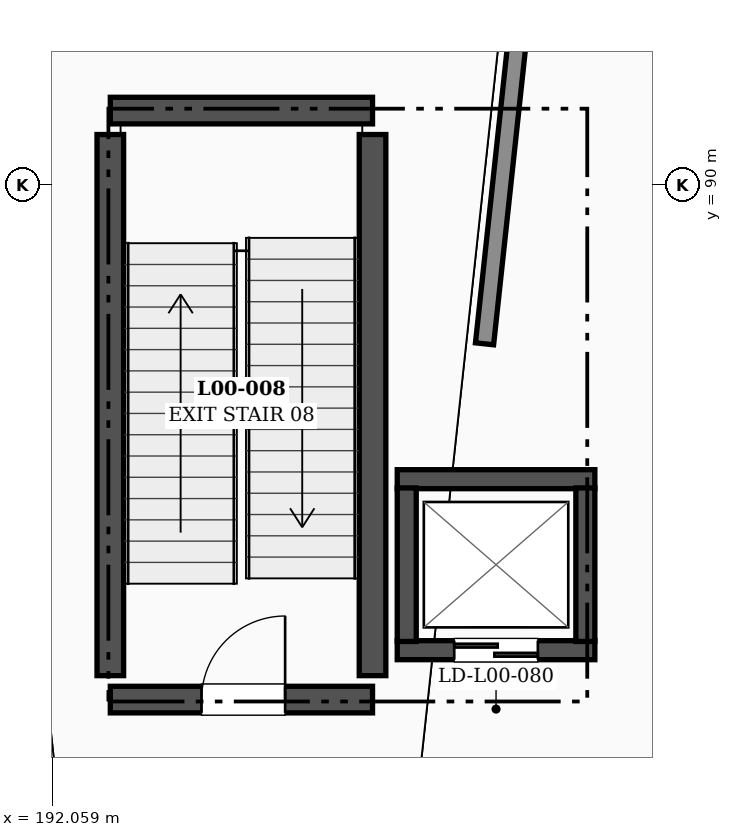
"""IFC4 building model, lengths in metres.
Left out: names, types, materials, properties, quantities, classifications, styles, units other than length and angle.
Written with IfcOpenShell. Run it as: python <this file> out.ifc"""

import sys

from ifc_helpers import new_model, si_unit, direction, frame, frame_2d, origin, place, context, subcontext, project, spatial, rectangle, extrude, element, fill, save


model = new_model("IFC4")
c1 = context("Model", 3, precision=1e-05, world=origin(), true_north=direction((0.0, 1.0)))
c2 = subcontext(c1, "Body", "Model", "MODEL_VIEW")
j1 = project(units=[si_unit("LENGTHUNIT", "METRE"), si_unit("PLANEANGLEUNIT", "RADIAN")], contexts=[c1])
p1 = place(None, origin())
s1 = spatial("IfcSite", under=j1, at=p1, CompositionType="ELEMENT")
p2 = place(p1, origin())
s2 = spatial("IfcBuilding", under=s1, at=p2, CompositionType="ELEMENT")
p3 = place(p2, origin())
s3 = spatial("IfcBuildingStorey", under=s2, at=p3, CompositionType="ELEMENT", Elevation=0.0)
p4 = place(p3, frame((205.371, 90.653, 0.0), z_axis=(0.0, 0.0, 1.0), x_axis=(-0.794325535109, 0.607492340918, 0.0)))
e1 = element("IfcWall", 1, at=p4, inside=s3, PredefinedType="SOLIDWALL", context=c2, shape_type="SweptSolid", body=[
    extrude(rectangle(XDim=8.583, YDim=0.26, at=frame_2d((4.291, 0.0))), origin(), (0.0, 0.0, 1.0), 4.99),
])
p5 = place(p4, frame((3.191, 0.0, 0.0)))
e2 = element("IfcOpeningElement", 2, at=p5, cuts=e1, PredefinedType="OPENING", context=c2, shape_type="SweptSolid", body=[
    extrude(rectangle(XDim=2.2, YDim=2.45, at=frame_2d((1.1, 1.225))), frame((0.0, 0.14, 0.0), z_axis=(0.0, -1.0, 0.0), x_axis=(1.0, 0.0, 0.0)), (0.0, 0.0, 1.0), 0.28),
])
p6 = place(p3, frame((192.825, 83.225, 0.0), z_axis=(0.0, 0.0, 1.0), x_axis=(1.0, 0.0, 0.0)))
e3 = element("IfcWall", 3, at=p6, inside=s3, PredefinedType="SHEAR", context=c2, shape_type="SweptSolid", body=[
    extrude(rectangle(XDim=3.45, YDim=0.35, at=frame_2d((1.725, 0.0))), origin(), (0.0, 0.0, 1.0), 6.0),
])
p7 = place(p6, frame((1.2, 0.0, 0.0)))
e4 = element("IfcOpeningElement", 4, at=p7, cuts=e3, PredefinedType="OPENING", context=c2, shape_type="SweptSolid", body=[
    extrude(rectangle(XDim=1.1, YDim=2.2, at=frame_2d((0.55, 1.1))), frame((0.0, 0.185, 0.0), z_axis=(0.0, -1.0, 0.0), x_axis=(1.0, 0.0, 0.0)), (0.0, 0.0, 1.0), 0.37),
])
p8 = place(p3, frame((192.825, 90.975, 0.0), z_axis=(0.0, 0.0, 1.0), x_axis=(1.0, 0.0, 0.0)))
e5 = element("IfcWall", 5, at=p8, inside=s3, PredefinedType="SHEAR", context=c2, shape_type="SweptSolid", body=[
    extrude(rectangle(XDim=3.45, YDim=0.35, at=frame_2d((1.725, 0.0))), origin(), (0.0, 0.0, 1.0), 6.0),
])
for number, where, z_axis, x_axis in (
    (6, (192.825, 83.54, 0.0), (0.0, 0.0, 1.0), (0.0, 1.0, 0.0)),
    (7, (196.275, 83.54, 0.0), (0.0, 0.0, 1.0), (0.0, 1.0, 0.0)),
):
    element("IfcWall", number, at=place(p3, frame(where, z_axis=z_axis, x_axis=x_axis)), inside=s3, PredefinedType="SHEAR", context=c2, shape_type="SweptSolid", body=[
        extrude(rectangle(XDim=7.12, YDim=0.35, at=frame_2d((3.56, 0.0))), origin(), (0.0, 0.0, 1.0), 6.0),
    ])
p9 = place(p3, frame((196.6, 83.875, 0.0), z_axis=(0.0, 0.0, 1.0), x_axis=(1.0, 0.0, 0.0)))
e8 = element("IfcWall", 8, at=p9, inside=s3, PredefinedType="SHEAR", context=c2, shape_type="SweptSolid", body=[
    extrude(rectangle(XDim=2.6, YDim=0.25, at=frame_2d((1.3, 0.0))), origin(), (0.0, 0.0, 1.0), 6.0),
])
p10 = place(p9, frame((0.75, 0.0, 0.0)))
e9 = element("IfcOpeningElement", 9, at=p10, cuts=e8, PredefinedType="OPENING", context=c2, shape_type="SweptSolid", body=[
    extrude(rectangle(XDim=1.1, YDim=2.2, at=frame_2d((0.55, 1.1))), frame((0.0, 0.135, 0.0), z_axis=(0.0, -1.0, 0.0), x_axis=(1.0, 0.0, 0.0)), (0.0, 0.0, 1.0), 0.27),
])
p11 = place(p3, frame((196.6, 86.125, 0.0), z_axis=(0.0, 0.0, 1.0), x_axis=(1.0, 0.0, 0.0)))
e10 = element("IfcWall", 10, at=p11, inside=s3, PredefinedType="SHEAR", context=c2, shape_type="SweptSolid", body=[
    extrude(rectangle(XDim=2.6, YDim=0.25, at=frame_2d((1.3, 0.0))), origin(), (0.0, 0.0, 1.0), 6.0),
])
for number, where, z_axis, x_axis in (
    (11, (196.725, 83.99, 0.0), (0.0, 0.0, 1.0), (0.0, 1.0, 0.0)),
    (12, (199.075, 83.99, 0.0), (0.0, 0.0, 1.0), (0.0, 1.0, 0.0)),
):
    element("IfcWall", number, at=place(p3, frame(where, z_axis=z_axis, x_axis=x_axis)), inside=s3, PredefinedType="SHEAR", context=c2, shape_type="SweptSolid", body=[
        extrude(rectangle(XDim=2.02, YDim=0.25, at=frame_2d((1.01, 0.0))), origin(), (0.0, 0.0, 1.0), 6.0),
    ])
p12 = place(p3, frame((197.749, 87.906, 0.0), z_axis=(0.0, 0.0, 1.0), x_axis=(0.107124111103, 0.994245656174, 0.0)))
e13 = element("IfcWall", 13, at=p12, inside=s3, PredefinedType="PARTITIONING", context=c2, shape_type="SweptSolid", body=[
    extrude(rectangle(XDim=6.053, YDim=0.24, at=frame_2d((3.027, 0.0))), origin(), (0.0, 0.0, 1.0), 4.94),
])
p13 = place(p7, origin())
e14 = element("IfcDoor", 14, at=p13, inside=s3, OperationType="SINGLE_SWING_RIGHT", PredefinedType="DOOR", context=c2, shape_type="SweptSolid", body=[
    extrude(rectangle(XDim=1.1, YDim=2.2, at=frame_2d((0.55, 1.1))), frame((0.0, 0.025, 0.0), z_axis=(0.0, -1.0, 0.0), x_axis=(1.0, 0.0, 0.0)), (0.0, 0.0, 1.0), 0.05),
])
fill(e4, e14)
p14 = place(p10, origin())
e15 = element("IfcDoor", 15, at=p14, inside=s3, OperationType="DOUBLE_DOOR_SLIDING", PredefinedType="DOOR", context=c2, shape_type="SweptSolid", body=[
    extrude(rectangle(XDim=1.1, YDim=2.2, at=frame_2d((0.55, 1.1))), frame((0.0, 0.025, 0.0), z_axis=(0.0, -1.0, 0.0), x_axis=(1.0, 0.0, 0.0)), (0.0, 0.0, 1.0), 0.05),
])
fill(e9, e15)
save(model, sys.argv[1])
